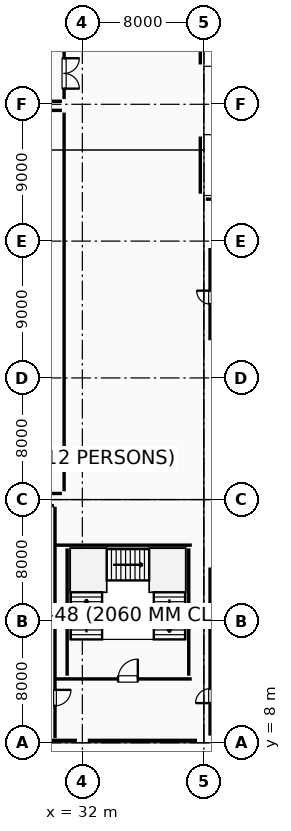
"""IFC4 building model, lengths in metres.
Left out: names, types, materials, properties, quantities, classifications, styles, units other than length and angle.
Written with IfcOpenShell. Run it as: python <this file> out.ifc"""

import sys

from ifc_helpers import new_model, si_unit, direction, frame, frame_2d, origin, origin_2d, place, context, subcontext, project, spatial, rectangle, circle, i_section, extrude, element, fill, save


model = new_model("IFC4")
c1 = context("Model", 3, precision=1e-05, world=origin(), true_north=direction((0.0, 1.0)))
c2 = subcontext(c1, "Body", "Model", "MODEL_VIEW")
j1 = project(units=[si_unit("LENGTHUNIT", "METRE"), si_unit("PLANEANGLEUNIT", "RADIAN")], contexts=[c1])
p1 = place(None, origin())
s1 = spatial("IfcSite", under=j1, at=p1, CompositionType="ELEMENT")
p2 = place(p1, origin())
s2 = spatial("IfcBuilding", under=s1, at=p2, CompositionType="ELEMENT")
p3 = place(p2, frame((0.0, 0.0, 10.2)))
s3 = spatial("IfcBuildingStorey", under=s2, at=p3, CompositionType="ELEMENT", Elevation=10.2)
p4 = place(p3, frame((32.0, 8.0, 0.0), z_axis=(0.0, 0.0, 1.0), x_axis=(1.0, 0.0, 0.0)))
e1 = element("IfcColumn", 1, at=p4, inside=s3, PredefinedType="COLUMN", context=c2, shape_type="SweptSolid", body=[
    extrude(circle(Radius=0.35, at=origin_2d()), origin(), (0.0, 0.0, 1.0), 4.8),
])
for number, where, z_axis, x_axis in (
    (2, (32.0, 24.0, 0.0), (0.0, 0.0, 1.0), (1.0, 0.0, 0.0)),
    (3, (32.0, 50.0, 0.0), (0.0, 0.0, 1.0), (1.0, 0.0, 0.0)),
):
    element("IfcColumn", number, at=place(p3, frame(where, z_axis=z_axis, x_axis=x_axis)), inside=s3, PredefinedType="COLUMN", context=c2, shape_type="SweptSolid", body=[
        extrude(rectangle(XDim=0.75, YDim=0.75, at=origin_2d()), origin(), (0.0, 0.0, 1.0), 4.8),
    ])
for number, where, z_axis, x_axis in (
    (4, (40.0, 8.0, 0.0), (0.0, 0.0, 1.0), (1.0, 0.0, 0.0)),
    (5, (40.0, 16.0, 0.0), (0.0, 0.0, 1.0), (1.0, 0.0, 0.0)),
    (6, (40.0, 24.0, 0.0), (0.0, 0.0, 1.0), (1.0, 0.0, 0.0)),
    (7, (40.0, 32.0, 0.0), (0.0, 0.0, 1.0), (1.0, 0.0, 0.0)),
    (8, (40.0, 41.0, 0.0), (0.0, 0.0, 1.0), (1.0, 0.0, 0.0)),
    (9, (40.0, 50.0, 0.0), (0.0, 0.0, 1.0), (1.0, 0.0, 0.0)),
):
    element("IfcColumn", number, at=place(p3, frame(where, z_axis=z_axis, x_axis=x_axis)), inside=s3, PredefinedType="COLUMN", context=c2, shape_type="SweptSolid", body=[
        extrude(rectangle(XDim=0.9, YDim=0.9, at=origin_2d()), origin(), (0.0, 0.0, 1.0), 4.8),
    ])
for number, where, z_axis, x_axis in (
    (10, (40.0, 48.2, 0.0), (0.0, 0.0, 1.0), (1.0, 0.0, 0.0)),
    (11, (40.0, 52.3, 0.0), (0.0, 0.0, 1.0), (1.0, 0.0, 0.0)),
    (12, (33.52, 17.98, 0.0), (0.0, 0.0, 1.0), (1.0, 0.0, 0.0)),
    (13, (36.48, 17.98, 0.0), (0.0, 0.0, 1.0), (1.0, 0.0, 0.0)),
):
    element("IfcColumn", number, at=place(p3, frame(where, z_axis=z_axis, x_axis=x_axis)), inside=s3, PredefinedType="COLUMN", context=c2, shape_type="SweptSolid", body=[
        extrude(i_section(OverallWidth=0.25, OverallDepth=0.35, WebThickness=0.01, FlangeThickness=0.012, FilletRadius=0.012, at=origin_2d()), origin(), (0.0, 0.0, 1.0), 4.8),
    ])
p5 = place(p3, frame((39.76, 47.88, 0.0), z_axis=(0.0, 0.0, 1.0), x_axis=(0.0, -1.0, 0.0)))
e14 = element("IfcWall", 14, at=p5, inside=s3, PredefinedType="PARAPET", context=c2, shape_type="SweptSolid", body=[
    extrude(rectangle(XDim=3.76, YDim=0.18, at=frame_2d((1.88, 0.0))), origin(), (0.0, 0.0, 1.0), 0.88),
])
p6 = place(p3, frame((40.12, 43.76, 0.0), z_axis=(0.0, 0.0, 1.0), x_axis=(1.0, 0.0, 0.0)))
e15 = element("IfcWall", 15, at=p6, inside=s3, PredefinedType="PARAPET", context=c2, shape_type="SweptSolid", body=[
    extrude(rectangle(XDim=23.76, YDim=0.18, at=frame_2d((11.88, 0.0))), origin(), (0.0, 0.0, 1.0), 0.88),
])
p7 = place(p3, frame((39.542, 8.16, 0.0), z_axis=(0.0, 0.0, 1.0), x_axis=(-1.0, 0.0, 0.0)))
e16 = element("IfcWall", 16, at=p7, inside=s3, PredefinedType="STANDARD", context=c2, shape_type="SweptSolid", body=[
    extrude(rectangle(XDim=7.184, YDim=0.28, at=frame_2d((3.592, 0.0))), origin(), (0.0, 0.0, 1.0), 4.125),
])
p8 = place(p7, frame((2.392, 0.0, 0.95)))
e17 = element("IfcOpeningElement", 17, at=p8, cuts=e16, PredefinedType="OPENING", context=c2, shape_type="SweptSolid", body=[
    extrude(rectangle(XDim=2.4, YDim=1.2, at=frame_2d((1.2, 0.6))), frame((0.0, 0.15, 0.0), z_axis=(0.0, -1.0, 0.0), x_axis=(1.0, 0.0, 0.0)), (0.0, 0.0, 1.0), 0.3),
])
p9 = place(p3, frame((31.642, 8.16, 0.0), z_axis=(0.0, 0.0, 1.0), x_axis=(-1.0, 0.0, 0.0)))
e18 = element("IfcWall", 18, at=p9, inside=s3, PredefinedType="STANDARD", context=c2, shape_type="SweptSolid", body=[
    extrude(rectangle(XDim=7.284, YDim=0.28, at=frame_2d((3.642, 0.0))), origin(), (0.0, 0.0, 1.0), 4.075),
])
p10 = place(p9, frame((2.442, 0.0, 0.95)))
e19 = element("IfcOpeningElement", 19, at=p10, cuts=e18, PredefinedType="OPENING", context=c2, shape_type="SweptSolid", body=[
    extrude(rectangle(XDim=2.4, YDim=1.5, at=frame_2d((1.2, 0.75))), frame((0.0, 0.15, 0.0), z_axis=(0.0, -1.0, 0.0), x_axis=(1.0, 0.0, 0.0)), (0.0, 0.0, 1.0), 0.3),
])
p11 = place(p3, frame((39.76, 55.54, 0.0), z_axis=(0.0, 0.0, 1.0), x_axis=(0.0, -1.0, 0.0)))
e20 = element("IfcWall", 20, at=p11, inside=s3, PredefinedType="PARAPET", context=c2, shape_type="SweptSolid", body=[
    extrude(rectangle(XDim=2.92, YDim=0.18, at=frame_2d((1.46, 0.0))), origin(), (0.0, 0.0, 1.0), 0.88),
])
p12 = place(p3, frame((30.254, 12.2, 0.0), z_axis=(0.0, 0.0, 1.0), x_axis=(1.0, 0.0, 0.0)))
e21 = element("IfcWall", 21, at=p12, inside=s3, PredefinedType="SHEAR", context=c2, shape_type="SweptSolid", body=[
    extrude(rectangle(XDim=8.946, YDim=0.4, at=frame_2d((4.473, 0.0))), origin(), (0.0, 0.0, 1.0), 4.54),
])
p13 = place(p12, frame((4.096, 0.0, 0.0)))
e22 = element("IfcOpeningElement", 22, at=p13, cuts=e21, PredefinedType="OPENING", context=c2, shape_type="SweptSolid", body=[
    extrude(rectangle(XDim=1.3, YDim=2.15, at=frame_2d((0.65, 1.075))), frame((0.0, 0.21, 0.0), z_axis=(0.0, -1.0, 0.0), x_axis=(1.0, 0.0, 0.0)), (0.0, 0.0, 1.0), 0.42),
])
p14 = place(p3, frame((39.2, 21.0, 0.0), z_axis=(0.0, 0.0, 1.0), x_axis=(-1.0, 0.0, 0.0)))
e23 = element("IfcWall", 23, at=p14, inside=s3, PredefinedType="SHEAR", context=c2, shape_type="SweptSolid", body=[
    extrude(rectangle(XDim=8.946, YDim=0.4, at=frame_2d((4.473, 0.0))), origin(), (0.0, 0.0, 1.0), 4.54),
])
for number, where, z_axis, x_axis in (
    (24, (39.0, 12.41, 0.0), (0.0, 0.0, 1.0), (0.0, 1.0, 0.0)),
    (25, (31.0, 20.79, 0.0), (0.0, 0.0, 1.0), (0.0, -1.0, 0.0)),
):
    element("IfcWall", number, at=place(p3, frame(where, z_axis=z_axis, x_axis=x_axis)), inside=s3, PredefinedType="SHEAR", context=c2, shape_type="SweptSolid", body=[
        extrude(rectangle(XDim=8.38, YDim=0.4, at=frame_2d((4.19, 0.0))), origin(), (0.0, 0.0, 1.0), 4.54),
    ])
p15 = place(p3, frame((24.39, 49.6, 0.0), z_axis=(0.0, 0.0, 1.0), x_axis=(1.0, 0.0, 0.0)))
e26 = element("IfcWall", 26, at=p15, inside=s3, PredefinedType="PARTITIONING", context=c2, shape_type="SweptSolid", body=[
    extrude(rectangle(XDim=6.265, YDim=0.25, at=frame_2d((3.133, 0.0))), origin(), (0.0, 0.0, 1.0), 4.53),
])
p16 = place(p3, frame((30.8, 49.455, 0.0), z_axis=(0.0, 0.0, 1.0), x_axis=(0.0, -1.0, 0.0)))
e27 = element("IfcWall", 27, at=p16, inside=s3, PredefinedType="PARTITIONING", context=c2, shape_type="SweptSolid", body=[
    extrude(rectangle(XDim=24.91, YDim=0.25, at=frame_2d((12.455, 0.0))), origin(), (0.0, 0.0, 1.0), 4.53),
])
p17 = place(p3, frame((30.655, 24.4, 0.0), z_axis=(0.0, 0.0, 1.0), x_axis=(-1.0, 0.0, 0.0)))
e28 = element("IfcWall", 28, at=p17, inside=s3, PredefinedType="PARTITIONING", context=c2, shape_type="SweptSolid", body=[
    extrude(rectangle(XDim=6.265, YDim=0.25, at=frame_2d((3.133, 0.0))), origin(), (0.0, 0.0, 1.0), 4.53),
])
p18 = place(p17, frame((2.183, 0.0, 0.0)))
e29 = element("IfcOpeningElement", 29, at=p18, cuts=e28, PredefinedType="OPENING", context=c2, shape_type="SweptSolid", body=[
    extrude(rectangle(XDim=1.9, YDim=2.35, at=frame_2d((0.95, 1.175))), frame((0.0, 0.135, 0.0), z_axis=(0.0, -1.0, 0.0), x_axis=(1.0, 0.0, 0.0)), (0.0, 0.0, 1.0), 0.27),
])
p19 = place(p3, frame((30.8, 55.576, 0.0), z_axis=(0.0, 0.0, 1.0), x_axis=(0.0, -1.0, 0.0)))
e30 = element("IfcWall", 30, at=p19, inside=s3, PredefinedType="PARTITIONING", context=c2, shape_type="SweptSolid", body=[
    extrude(rectangle(XDim=5.231, YDim=0.25, at=frame_2d((2.615, 0.0))), origin(), (0.0, 0.0, 1.0), 4.53),
])
p20 = place(p19, frame((2.547, 0.0, 0.0)))
e31 = element("IfcOpeningElement", 31, at=p20, cuts=e30, PredefinedType="OPENING", context=c2, shape_type="SweptSolid", body=[
    extrude(rectangle(XDim=2.0, YDim=2.35, at=frame_2d((1.0, 1.175))), frame((0.0, 0.135, 0.0), z_axis=(0.0, -1.0, 0.0), x_axis=(1.0, 0.0, 0.0)), (0.0, 0.0, 1.0), 0.27),
])
p21 = place(p3, frame((30.655, 50.2, 0.0), z_axis=(0.0, 0.0, 1.0), x_axis=(-1.0, 0.0, 0.0)))
e32 = element("IfcWall", 32, at=p21, inside=s3, PredefinedType="PARTITIONING", context=c2, shape_type="SweptSolid", body=[
    extrude(rectangle(XDim=1.91, YDim=0.25, at=frame_2d((0.955, 0.0))), origin(), (0.0, 0.0, 1.0), 4.07),
])
p22 = place(p3, frame((40.4, 8.47, 0.0), z_axis=(0.0, 0.0, 1.0), x_axis=(0.0, 1.0, 0.0)))
e33 = element("IfcWall", 33, at=p22, inside=s3, PredefinedType="PARTITIONING", context=c2, shape_type="SweptSolid", body=[
    extrude(rectangle(XDim=7.065, YDim=0.1, at=frame_2d((3.532, 0.0))), origin(), (0.0, 0.0, 1.0), 4.57),
])
p23 = place(p22, frame((2.14, 0.0, 0.0)))
e34 = element("IfcOpeningElement", 34, at=p23, cuts=e33, PredefinedType="OPENING", context=c2, shape_type="SweptSolid", body=[
    extrude(rectangle(XDim=0.95, YDim=2.15, at=frame_2d((0.475, 1.075))), frame((0.0, 0.06, 0.0), z_axis=(0.0, -1.0, 0.0), x_axis=(1.0, 0.0, 0.0)), (0.0, 0.0, 1.0), 0.12),
])
p24 = place(p3, frame((40.4, 16.465, 0.0), z_axis=(0.0, 0.0, 1.0), x_axis=(0.0, 1.0, 0.0)))
e35 = element("IfcWall", 35, at=p24, inside=s3, PredefinedType="PARTITIONING", context=c2, shape_type="SweptSolid", body=[
    extrude(rectangle(XDim=3.065, YDim=0.1, at=frame_2d((1.532, 0.0))), origin(), (0.0, 0.0, 1.0), 4.53),
])
p25 = place(p3, frame((30.2, 23.53, 0.0), z_axis=(0.0, 0.0, 1.0), x_axis=(0.0, -1.0, 0.0)))
e36 = element("IfcWall", 36, at=p25, inside=s3, PredefinedType="PARTITIONING", context=c2, shape_type="SweptSolid", body=[
    extrude(rectangle(XDim=15.226, YDim=0.1, at=frame_2d((7.613, 0.0))), origin(), (0.0, 0.0, 1.0), 4.53),
])
p26 = place(p25, frame((12.049, 0.0, 0.0)))
e37 = element("IfcOpeningElement", 37, at=p26, cuts=e36, PredefinedType="OPENING", context=c2, shape_type="SweptSolid", body=[
    extrude(rectangle(XDim=1.05, YDim=2.15, at=frame_2d((0.525, 1.075))), frame((0.0, 0.06, 0.0), z_axis=(0.0, -1.0, 0.0), x_axis=(1.0, 0.0, 0.0)), (0.0, 0.0, 1.0), 0.12),
])
p27 = place(p3, frame((24.39, 23.6, 0.0), z_axis=(0.0, 0.0, 1.0), x_axis=(1.0, 0.0, 0.0)))
e38 = element("IfcWall", 38, at=p27, inside=s3, PredefinedType="PARTITIONING", context=c2, shape_type="SweptSolid", body=[
    extrude(rectangle(XDim=5.74, YDim=0.1, at=frame_2d((2.87, 0.0))), origin(), (0.0, 0.0, 1.0), 4.53),
])
p28 = place(p3, frame((40.4, 34.48, 0.0), z_axis=(0.0, 0.0, 1.0), x_axis=(0.0, 1.0, 0.0)))
e39 = element("IfcWall", 39, at=p28, inside=s3, PredefinedType="PARTITIONING", context=c2, shape_type="SweptSolid", body=[
    extrude(rectangle(XDim=6.066, YDim=0.12, at=frame_2d((3.033, 0.0))), origin(), (0.0, 0.0, 1.0), 4.53),
])
p29 = place(p28, frame((2.38, 0.0, 0.0)))
e40 = element("IfcOpeningElement", 40, at=p29, cuts=e39, PredefinedType="OPENING", context=c2, shape_type="SweptSolid", body=[
    extrude(rectangle(XDim=0.88, YDim=2.1, at=frame_2d((0.44, 1.05))), frame((0.0, 0.07, 0.0), z_axis=(0.0, -1.0, 0.0), x_axis=(1.0, 0.0, 0.0)), (0.0, 0.0, 1.0), 0.14),
])
p30 = place(p8, origin())
e41 = element("IfcWindow", 41, at=p30, inside=s3, PartitioningType="SINGLE_PANEL", PredefinedType="SKYLIGHT", context=c2, shape_type="SweptSolid", body=[
    extrude(rectangle(XDim=2.4, YDim=1.2, at=frame_2d((1.2, 0.6))), frame((0.0, 0.03, 0.0), z_axis=(0.0, -1.0, 0.0), x_axis=(1.0, 0.0, 0.0)), (0.0, 0.0, 1.0), 0.06),
])
fill(e17, e41)
p31 = place(p13, origin())
e42 = element("IfcDoor", 42, at=p31, inside=s3, OperationType="SINGLE_SWING_RIGHT", PredefinedType="DOOR", context=c2, shape_type="SweptSolid", body=[
    extrude(rectangle(XDim=1.3, YDim=2.15, at=frame_2d((0.65, 1.075))), frame((0.0, 0.025, 0.0), z_axis=(0.0, -1.0, 0.0), x_axis=(1.0, 0.0, 0.0)), (0.0, 0.0, 1.0), 0.05),
])
fill(e22, e42)
p32 = place(p20, origin())
e43 = element("IfcDoor", 43, at=p32, inside=s3, OperationType="DOUBLE_SWING_LEFT", PredefinedType="DOOR", context=c2, shape_type="SweptSolid", body=[
    extrude(rectangle(XDim=2.0, YDim=2.35, at=frame_2d((1.0, 1.175))), frame((0.0, 0.025, 0.0), z_axis=(0.0, -1.0, 0.0), x_axis=(1.0, 0.0, 0.0)), (0.0, 0.0, 1.0), 0.05),
])
fill(e31, e43)
p33 = place(p23, origin())
e44 = element("IfcDoor", 44, at=p33, inside=s3, OperationType="SINGLE_SWING_LEFT", PredefinedType="DOOR", context=c2, shape_type="SweptSolid", body=[
    extrude(rectangle(XDim=0.95, YDim=2.15, at=frame_2d((0.475, 1.075))), frame((0.0, 0.025, 0.0), z_axis=(0.0, -1.0, 0.0), x_axis=(1.0, 0.0, 0.0)), (0.0, 0.0, 1.0), 0.05),
])
fill(e34, e44)
p34 = place(p26, origin())
e45 = element("IfcDoor", 45, at=p34, inside=s3, OperationType="SINGLE_SWING_LEFT", PredefinedType="DOOR", context=c2, shape_type="SweptSolid", body=[
    extrude(rectangle(XDim=1.05, YDim=2.15, at=frame_2d((0.525, 1.075))), frame((0.0, 0.025, 0.0), z_axis=(0.0, -1.0, 0.0), x_axis=(1.0, 0.0, 0.0)), (0.0, 0.0, 1.0), 0.05),
])
fill(e37, e45)
p35 = place(p29, origin())
e46 = element("IfcDoor", 46, at=p35, inside=s3, OperationType="SINGLE_SWING_RIGHT", PredefinedType="DOOR", context=c2, shape_type="SweptSolid", body=[
    extrude(rectangle(XDim=0.88, YDim=2.1, at=frame_2d((0.44, 1.05))), frame((0.0, 0.025, 0.0), z_axis=(0.0, -1.0, 0.0), x_axis=(1.0, 0.0, 0.0)), (0.0, 0.0, 1.0), 0.05),
])
fill(e40, e46)
save(model, sys.argv[1])
